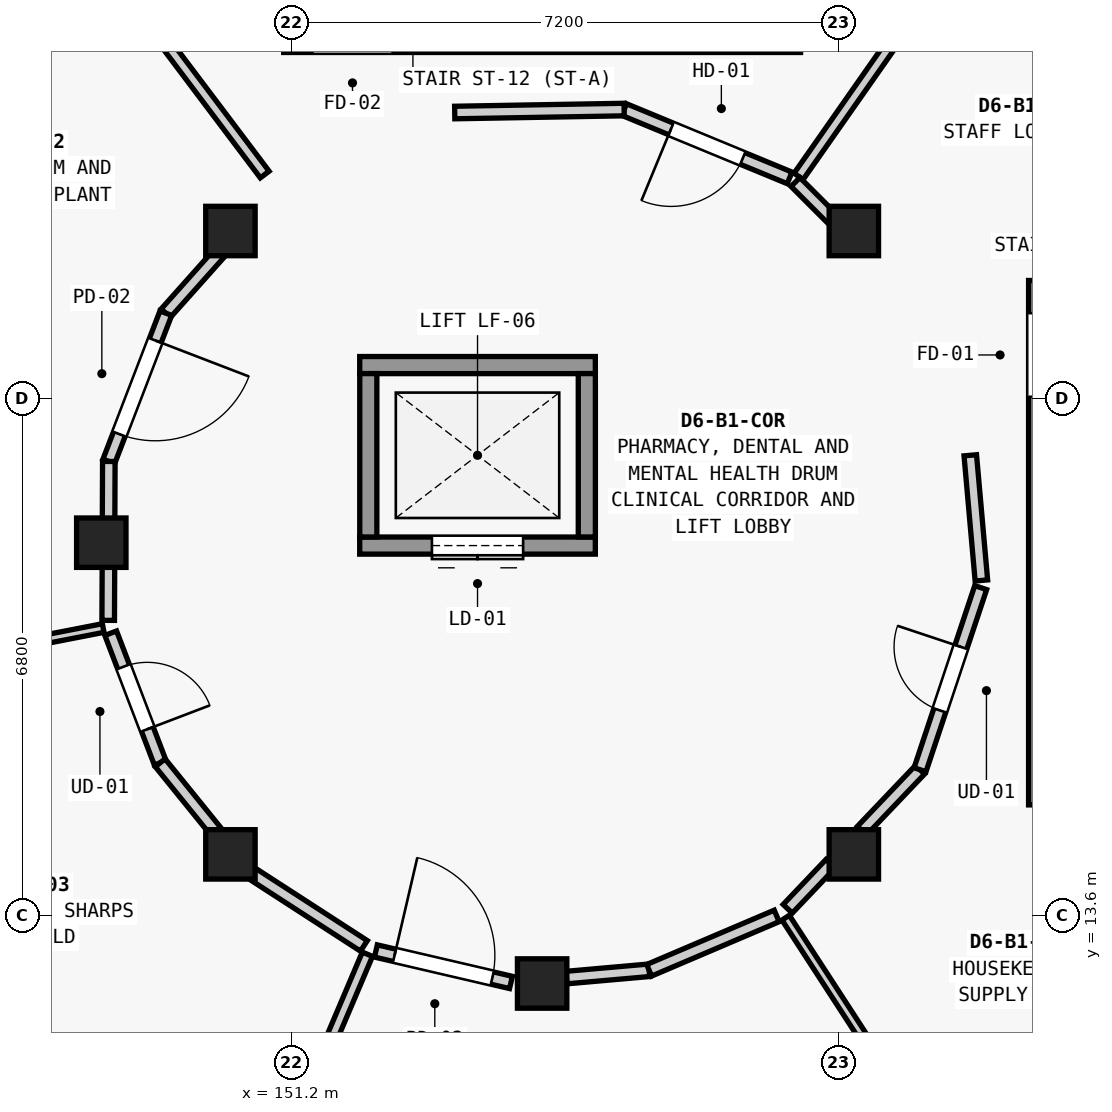
"""IFC4 building model, lengths in metres.
Left out: names, types, materials, properties, quantities, classifications, styles, units other than length and angle.
Written with IfcOpenShell. Run it as: python <this file> out.ifc"""

import sys

from ifc_helpers import new_model, si_unit, direction, frame, frame_2d, origin, origin_2d, place, context, subcontext, project, spatial, rectangle, extrude, element, fill, save


model = new_model("IFC4")
c1 = context("Model", 3, precision=1e-05, world=origin(), true_north=direction((0.0, 1.0)))
c2 = subcontext(c1, "Body", "Model", "MODEL_VIEW")
j1 = project(units=[si_unit("LENGTHUNIT", "METRE"), si_unit("PLANEANGLEUNIT", "RADIAN")], contexts=[c1])
p1 = place(None, origin())
s1 = spatial("IfcSite", under=j1, at=p1, CompositionType="ELEMENT")
p2 = place(p1, origin())
s2 = spatial("IfcBuilding", under=s1, at=p2, CompositionType="ELEMENT")
p3 = place(p2, frame((0.0, 0.0, -4.55)))
s3 = spatial("IfcBuildingStorey", under=s2, at=p3, CompositionType="ELEMENT", Elevation=-4.55)
for number, where, z_axis, x_axis in (
    (1, (158.601, 22.601, 0.0), (0.0, 0.0, 1.0), (1.0, 0.0, 0.0)),
    (2, (150.399, 22.601, 0.0), (0.0, 0.0, 1.0), (1.0, 0.0, 0.0)),
    (3, (148.7, 18.5, 0.0), (0.0, 0.0, 1.0), (1.0, 0.0, 0.0)),
    (4, (150.399, 14.399, 0.0), (0.0, 0.0, 1.0), (1.0, 0.0, 0.0)),
    (5, (154.5, 12.7, 0.0), (0.0, 0.0, 1.0), (1.0, 0.0, 0.0)),
    (6, (158.601, 14.399, 0.0), (0.0, 0.0, 1.0), (1.0, 0.0, 0.0)),
):
    element("IfcColumn", number, at=place(p3, frame(where, z_axis=z_axis, x_axis=x_axis)), inside=s3, PredefinedType="COLUMN", context=c2, shape_type="SweptSolid", body=[
        extrude(rectangle(XDim=0.65, YDim=0.65, at=origin_2d()), origin(), (0.0, 0.0, 1.0), 4.55),
    ])
p4 = place(p3, frame((161.025, 21.95, 0.0), z_axis=(0.0, 0.0, 1.0), x_axis=(0.0, -1.0, 0.0)))
e7 = element("IfcWall", 7, at=p4, inside=s3, PredefinedType="SHEAR", context=c2, shape_type="SweptSolid", body=[
    extrude(rectangle(XDim=6.9, YDim=0.25, at=frame_2d((3.45, 0.0))), origin(), (0.0, 0.0, 1.0), 4.148),
])
p5 = place(p4, frame((0.43, 0.0, 0.0)))
e8 = element("IfcOpeningElement", 8, at=p5, cuts=e7, PredefinedType="OPENING", context=c2, shape_type="SweptSolid", body=[
    extrude(rectangle(XDim=1.1, YDim=2.15, at=frame_2d((0.55, 1.075))), frame((0.0, 0.135, 0.0), z_axis=(0.0, -1.0, 0.0), x_axis=(1.0, 0.0, 0.0)), (0.0, 0.0, 1.0), 0.27),
])
p6 = place(p3, frame((152.1, 18.462, 0.0), z_axis=(0.0, 0.0, 1.0), x_axis=(1.0, 0.0, 0.0)))
e9 = element("IfcWall", 9, at=p6, inside=s3, PredefinedType="SHEAR", context=c2, shape_type="SweptSolid", body=[
    extrude(rectangle(XDim=3.1, YDim=0.225, at=frame_2d((1.55, 0.0))), origin(), (0.0, 0.0, 1.0), 4.148),
])
p7 = place(p6, frame((0.95, 0.0, 0.0)))
e10 = element("IfcOpeningElement", 10, at=p7, cuts=e9, PredefinedType="OPENING", context=c2, shape_type="SweptSolid", body=[
    extrude(rectangle(XDim=1.2, YDim=2.2, at=frame_2d((0.6, 1.1))), frame((0.0, 0.123, 0.0), z_axis=(0.0, -1.0, 0.0), x_axis=(1.0, 0.0, 0.0)), (0.0, 0.0, 1.0), 0.245),
])
p8 = place(p3, frame((152.1, 20.837, 0.0), z_axis=(0.0, 0.0, 1.0), x_axis=(1.0, 0.0, 0.0)))
e11 = element("IfcWall", 11, at=p8, inside=s3, PredefinedType="SHEAR", context=c2, shape_type="SweptSolid", body=[
    extrude(rectangle(XDim=3.1, YDim=0.225, at=frame_2d((1.55, 0.0))), origin(), (0.0, 0.0, 1.0), 4.148),
])
for number, where, z_axis, x_axis in (
    (12, (152.213, 18.575, 0.0), (0.0, 0.0, 1.0), (0.0, 1.0, 0.0)),
    (13, (155.088, 18.575, 0.0), (0.0, 0.0, 1.0), (0.0, 1.0, 0.0)),
):
    element("IfcWall", number, at=place(p3, frame(where, z_axis=z_axis, x_axis=x_axis)), inside=s3, PredefinedType="SHEAR", context=c2, shape_type="SweptSolid", body=[
        extrude(rectangle(XDim=2.15, YDim=0.225, at=frame_2d((1.075, 0.0))), origin(), (0.0, 0.0, 1.0), 4.148),
    ])
p9 = place(p3, frame((157.874, 23.319, 0.0), z_axis=(0.0, 0.0, 1.0), x_axis=(0.573579487823, 0.819149907617, 0.0)))
e14 = element("IfcWall", 14, at=p9, inside=s3, PredefinedType="PARTITIONING", context=c2, shape_type="SweptSolid", body=[
    extrude(rectangle(XDim=4.895, YDim=0.145, at=frame_2d((2.448, 0.0))), origin(), (0.0, 0.0, 1.0), 3.323),
])
p10 = place(p3, frame((150.85, 23.344, 0.0), z_axis=(0.0, 0.0, 1.0), x_axis=(-0.601830514666, 0.798623836118, 0.0)))
e15 = element("IfcWall", 15, at=p10, inside=s3, PredefinedType="PARTITIONING", context=c2, shape_type="SweptSolid", body=[
    extrude(rectangle(XDim=4.691, YDim=0.145, at=frame_2d((2.345, 0.0))), origin(), (0.0, 0.0, 1.0), 3.323),
])
p11 = place(p3, frame((148.725, 17.377, 0.0), z_axis=(0.0, 0.0, 1.0), x_axis=(-0.981631167978, -0.190788495604, 0.0)))
e16 = element("IfcWall", 16, at=p11, inside=s3, PredefinedType="PARTITIONING", context=c2, shape_type="SweptSolid", body=[
    extrude(rectangle(XDim=4.911, YDim=0.115, at=frame_2d((2.456, 0.0))), origin(), (0.0, 0.0, 1.0), 3.323),
])
p12 = place(p3, frame((152.201, 13.085, 0.0), z_axis=(0.0, 0.0, 1.0), x_axis=(-0.390680175244, -0.920526480157, 0.0)))
e17 = element("IfcWall", 17, at=p12, inside=s3, PredefinedType="PARTITIONING", context=c2, shape_type="SweptSolid", body=[
    extrude(rectangle(XDim=4.907, YDim=0.145, at=frame_2d((2.453, 0.0))), origin(), (0.0, 0.0, 1.0), 3.323),
])
p13 = place(p3, frame((157.704, 13.566, 0.0), z_axis=(0.0, 0.0, 1.0), x_axis=(0.544732798291, -0.83860966991, 0.0)))
e18 = element("IfcWall", 18, at=p13, inside=s3, PredefinedType="PARTITIONING", context=c2, shape_type="SweptSolid", body=[
    extrude(rectangle(XDim=4.903, YDim=0.115, at=frame_2d((2.452, 0.0))), origin(), (0.0, 0.0, 1.0), 3.323),
])
p14 = place(p3, frame((157.756, 23.3, 0.0), z_axis=(0.0, 0.0, 1.0), x_axis=(-0.924301971465, 0.381661978124, 0.0)))
e19 = element("IfcWall", 19, at=p14, inside=s3, PredefinedType="PARTITIONING", context=c2, shape_type="SweptSolid", body=[
    extrude(rectangle(XDim=2.355, YDim=0.165, at=frame_2d((1.178, 0.0))), origin(), (0.0, 0.0, 1.0), 3.323),
])
p15 = place(p14, frame((0.668, 0.0, 0.0)))
e20 = element("IfcOpeningElement", 20, at=p15, cuts=e19, PredefinedType="OPENING", context=c2, shape_type="SweptSolid", body=[
    extrude(rectangle(XDim=1.02, YDim=2.2, at=frame_2d((0.51, 1.1))), frame((0.0, 0.093, 0.0), z_axis=(0.0, -1.0, 0.0), x_axis=(1.0, 0.0, 0.0)), (0.0, 0.0, 1.0), 0.185),
])
p16 = place(p3, frame((155.579, 24.199, 0.0), z_axis=(0.0, 0.0, 1.0), x_axis=(-0.999846478786, -0.017521953626, 0.0)))
e21 = element("IfcWall", 21, at=p16, inside=s3, PredefinedType="PARTITIONING", context=c2, shape_type="SweptSolid", body=[
    extrude(rectangle(XDim=2.229, YDim=0.165, at=frame_2d((1.115, 0.0))), origin(), (0.0, 0.0, 1.0), 3.323),
])
p17 = place(p3, frame((150.251, 22.307, 0.0), z_axis=(0.0, 0.0, 1.0), x_axis=(-0.665670610056, -0.746245696073, 0.0)))
e22 = element("IfcWall", 22, at=p17, inside=s3, PredefinedType="PARTITIONING", context=c2, shape_type="SweptSolid", body=[
    extrude(rectangle(XDim=1.054, YDim=0.165, at=frame_2d((0.527, 0.0))), origin(), (0.0, 0.0, 1.0), 3.323),
])
p18 = place(p3, frame((149.549, 21.52, 0.0), z_axis=(0.0, 0.0, 1.0), x_axis=(-0.358830356871, -0.93340279354, 0.0)))
e23 = element("IfcWall", 23, at=p18, inside=s3, PredefinedType="PARTITIONING", context=c2, shape_type="SweptSolid", body=[
    extrude(rectangle(XDim=2.09, YDim=0.165, at=frame_2d((1.045, 0.0))), origin(), (0.0, 0.0, 1.0), 3.323),
])
p19 = place(p18, frame((0.385, 0.0, 0.0)))
e24 = element("IfcOpeningElement", 24, at=p19, cuts=e23, PredefinedType="OPENING", context=c2, shape_type="SweptSolid", body=[
    extrude(rectangle(XDim=1.32, YDim=2.24, at=frame_2d((0.66, 1.12))), frame((0.0, 0.093, 0.0), z_axis=(0.0, -1.0, 0.0), x_axis=(1.0, 0.0, 0.0)), (0.0, 0.0, 1.0), 0.185),
])
p20 = place(p3, frame((148.799, 19.569, 0.0), z_axis=(0.0, 0.0, 1.0), x_axis=(-0.004213900998, -0.99999112148, 0.0)))
e25 = element("IfcWall", 25, at=p20, inside=s3, PredefinedType="PARTITIONING", context=c2, shape_type="SweptSolid", body=[
    extrude(rectangle(XDim=0.753, YDim=0.165, at=frame_2d((0.376, 0.0))), origin(), (0.0, 0.0, 1.0), 3.323),
])
p21 = place(p3, frame((148.794, 18.184, 0.0), z_axis=(0.0, 0.0, 1.0), x_axis=(-0.004149341873, -0.999991391444, 0.0)))
e26 = element("IfcWall", 26, at=p21, inside=s3, PredefinedType="PARTITIONING", context=c2, shape_type="SweptSolid", body=[
    extrude(rectangle(XDim=0.706, YDim=0.165, at=frame_2d((0.353, 0.0))), origin(), (0.0, 0.0, 1.0), 3.323),
])
p22 = place(p3, frame((148.824, 17.309, 0.0), z_axis=(0.0, 0.0, 1.0), x_axis=(0.356746140056, -0.934201365636, 0.0)))
e27 = element("IfcWall", 27, at=p22, inside=s3, PredefinedType="PARTITIONING", context=c2, shape_type="SweptSolid", body=[
    extrude(rectangle(XDim=1.825, YDim=0.165, at=frame_2d((0.913, 0.0))), origin(), (0.0, 0.0, 1.0), 3.323),
])
p23 = place(p22, frame((0.472, 0.0, 0.0)))
e28 = element("IfcOpeningElement", 28, at=p23, cuts=e27, PredefinedType="OPENING", context=c2, shape_type="SweptSolid", body=[
    extrude(rectangle(XDim=0.88, YDim=2.1, at=frame_2d((0.44, 1.05))), frame((0.0, 0.093, 0.0), z_axis=(0.0, -1.0, 0.0), x_axis=(1.0, 0.0, 0.0)), (0.0, 0.0, 1.0), 0.185),
])
p24 = place(p3, frame((149.475, 15.604, 0.0), z_axis=(0.0, 0.0, 1.0), x_axis=(0.62928673226, -0.777173216601, 0.0)))
e29 = element("IfcWall", 29, at=p24, inside=s3, PredefinedType="PARTITIONING", context=c2, shape_type="SweptSolid", body=[
    extrude(rectangle(XDim=1.19, YDim=0.165, at=frame_2d((0.595, 0.0))), origin(), (0.0, 0.0, 1.0), 3.323),
])
p25 = place(p3, frame((150.641, 14.175, 0.0), z_axis=(0.0, 0.0, 1.0), x_axis=(0.839472077777, -0.543402825382, 0.0)))
e30 = element("IfcWall", 30, at=p25, inside=s3, PredefinedType="PARTITIONING", context=c2, shape_type="SweptSolid", body=[
    extrude(rectangle(XDim=1.803, YDim=0.165, at=frame_2d((0.902, 0.0))), origin(), (0.0, 0.0, 1.0), 3.323),
])
p26 = place(p3, frame((152.313, 13.128, 0.0), z_axis=(0.0, 0.0, 1.0), x_axis=(0.973942767764, -0.22679392655, 0.0)))
e31 = element("IfcWall", 31, at=p26, inside=s3, PredefinedType="PARTITIONING", context=c2, shape_type="SweptSolid", body=[
    extrude(rectangle(XDim=1.825, YDim=0.165, at=frame_2d((0.912, 0.0))), origin(), (0.0, 0.0, 1.0), 3.323),
])
p27 = place(p26, frame((0.252, 0.0, 0.0)))
e32 = element("IfcOpeningElement", 32, at=p27, cuts=e31, PredefinedType="OPENING", context=c2, shape_type="SweptSolid", body=[
    extrude(rectangle(XDim=1.32, YDim=2.24, at=frame_2d((0.66, 1.12))), frame((0.0, 0.093, 0.0), z_axis=(0.0, -1.0, 0.0), x_axis=(1.0, 0.0, 0.0)), (0.0, 0.0, 1.0), 0.185),
])
p28 = place(p3, frame((154.82, 12.778, 0.0), z_axis=(0.0, 0.0, 1.0), x_axis=(0.996133303229, 0.087854665208, 0.0)))
e33 = element("IfcWall", 33, at=p28, inside=s3, PredefinedType="PARTITIONING", context=c2, shape_type="SweptSolid", body=[
    extrude(rectangle(XDim=1.092, YDim=0.165, at=frame_2d((0.546, 0.0))), origin(), (0.0, 0.0, 1.0), 3.323),
])
p29 = place(p3, frame((155.908, 12.874, 0.0), z_axis=(0.0, 0.0, 1.0), x_axis=(0.919946215616, 0.392044589777, 0.0)))
e34 = element("IfcWall", 34, at=p29, inside=s3, PredefinedType="PARTITIONING", context=c2, shape_type="SweptSolid", body=[
    extrude(rectangle(XDim=1.824, YDim=0.165, at=frame_2d((0.912, 0.0))), origin(), (0.0, 0.0, 1.0), 3.323),
])
p30 = place(p3, frame((157.731, 13.683, 0.0), z_axis=(0.0, 0.0, 1.0), x_axis=(0.689282536267, 0.724492639851, 0.0)))
e35 = element("IfcWall", 35, at=p30, inside=s3, PredefinedType="PARTITIONING", context=c2, shape_type="SweptSolid", body=[
    extrude(rectangle(XDim=0.818, YDim=0.165, at=frame_2d((0.409, 0.0))), origin(), (0.0, 0.0, 1.0), 3.323),
])
p31 = place(p3, frame((158.708, 14.711, 0.0), z_axis=(0.0, 0.0, 1.0), x_axis=(0.689704707085, 0.724090751926, 0.0)))
e36 = element("IfcWall", 36, at=p31, inside=s3, PredefinedType="PARTITIONING", context=c2, shape_type="SweptSolid", body=[
    extrude(rectangle(XDim=1.108, YDim=0.165, at=frame_2d((0.554, 0.0))), origin(), (0.0, 0.0, 1.0), 3.323),
])
p32 = place(p3, frame((159.472, 15.513, 0.0), z_axis=(0.0, 0.0, 1.0), x_axis=(0.316024745021, 0.94875094758, 0.0)))
e37 = element("IfcWall", 37, at=p32, inside=s3, PredefinedType="PARTITIONING", context=c2, shape_type="SweptSolid", body=[
    extrude(rectangle(XDim=2.525, YDim=0.165, at=frame_2d((1.263, 0.0))), origin(), (0.0, 0.0, 1.0), 3.323),
])
p33 = place(p32, frame((0.823, 0.0, 0.0)))
e38 = element("IfcOpeningElement", 38, at=p33, cuts=e37, PredefinedType="OPENING", context=c2, shape_type="SweptSolid", body=[
    extrude(rectangle(XDim=0.88, YDim=2.1, at=frame_2d((0.44, 1.05))), frame((0.0, 0.093, 0.0), z_axis=(0.0, -1.0, 0.0), x_axis=(1.0, 0.0, 0.0)), (0.0, 0.0, 1.0), 0.185),
])
p34 = place(p3, frame((160.279, 18.003, 0.0), z_axis=(0.0, 0.0, 1.0), x_axis=(-0.088298877472, 0.996094025801, 0.0)))
e39 = element("IfcWall", 39, at=p34, inside=s3, PredefinedType="PARTITIONING", context=c2, shape_type="SweptSolid", body=[
    extrude(rectangle(XDim=1.653, YDim=0.165, at=frame_2d((0.827, 0.0))), origin(), (0.0, 0.0, 1.0), 3.323),
])
p35 = place(p3, frame((158.315, 22.764, 0.0), z_axis=(0.0, 0.0, 1.0), x_axis=(-0.706927698814, 0.707285818216, 0.0)))
e40 = element("IfcWall", 40, at=p35, inside=s3, PredefinedType="PARTITIONING", context=c2, shape_type="SweptSolid", body=[
    extrude(rectangle(XDim=0.682, YDim=0.165, at=frame_2d((0.341, 0.0))), origin(), (0.0, 0.0, 1.0), 3.323),
])
p36 = place(p7, origin())
e41 = element("IfcDoor", 41, at=p36, inside=s3, OperationType="DOUBLE_DOOR_SLIDING", PredefinedType="DOOR", context=c2, shape_type="SweptSolid", body=[
    extrude(rectangle(XDim=1.2, YDim=2.2, at=frame_2d((0.6, 1.1))), frame((0.0, 0.025, 0.0), z_axis=(0.0, -1.0, 0.0), x_axis=(1.0, 0.0, 0.0)), (0.0, 0.0, 1.0), 0.05),
])
fill(e10, e41)
p37 = place(p15, origin())
e42 = element("IfcDoor", 42, at=p37, inside=s3, OperationType="SINGLE_SWING_RIGHT", PredefinedType="DOOR", context=c2, shape_type="SweptSolid", body=[
    extrude(rectangle(XDim=1.02, YDim=2.2, at=frame_2d((0.51, 1.1))), frame((0.0, 0.025, 0.0), z_axis=(0.0, -1.0, 0.0), x_axis=(1.0, 0.0, 0.0)), (0.0, 0.0, 1.0), 0.05),
])
fill(e20, e42)
p38 = place(p19, origin())
e43 = element("IfcDoor", 43, at=p38, inside=s3, OperationType="SINGLE_SWING_LEFT", PredefinedType="DOOR", context=c2, shape_type="SweptSolid", body=[
    extrude(rectangle(XDim=1.32, YDim=2.24, at=frame_2d((0.66, 1.12))), frame((0.0, 0.025, 0.0), z_axis=(0.0, -1.0, 0.0), x_axis=(1.0, 0.0, 0.0)), (0.0, 0.0, 1.0), 0.05),
])
fill(e24, e43)
p39 = place(p23, origin())
e44 = element("IfcDoor", 44, at=p39, inside=s3, OperationType="SINGLE_SWING_RIGHT", PredefinedType="DOOR", context=c2, shape_type="SweptSolid", body=[
    extrude(rectangle(XDim=0.88, YDim=2.1, at=frame_2d((0.44, 1.05))), frame((0.0, 0.025, 0.0), z_axis=(0.0, -1.0, 0.0), x_axis=(1.0, 0.0, 0.0)), (0.0, 0.0, 1.0), 0.05),
])
fill(e28, e44)
p40 = place(p27, origin())
e45 = element("IfcDoor", 45, at=p40, inside=s3, OperationType="SINGLE_SWING_LEFT", PredefinedType="DOOR", context=c2, shape_type="SweptSolid", body=[
    extrude(rectangle(XDim=1.32, YDim=2.24, at=frame_2d((0.66, 1.12))), frame((0.0, 0.025, 0.0), z_axis=(0.0, -1.0, 0.0), x_axis=(1.0, 0.0, 0.0)), (0.0, 0.0, 1.0), 0.05),
])
fill(e32, e45)
p41 = place(p33, origin())
e46 = element("IfcDoor", 46, at=p41, inside=s3, OperationType="SINGLE_SWING_RIGHT", PredefinedType="DOOR", context=c2, shape_type="SweptSolid", body=[
    extrude(rectangle(XDim=0.88, YDim=2.1, at=frame_2d((0.44, 1.05))), frame((0.0, 0.025, 0.0), z_axis=(0.0, -1.0, 0.0), x_axis=(1.0, 0.0, 0.0)), (0.0, 0.0, 1.0), 0.05),
])
fill(e38, e46)
save(model, sys.argv[1])
